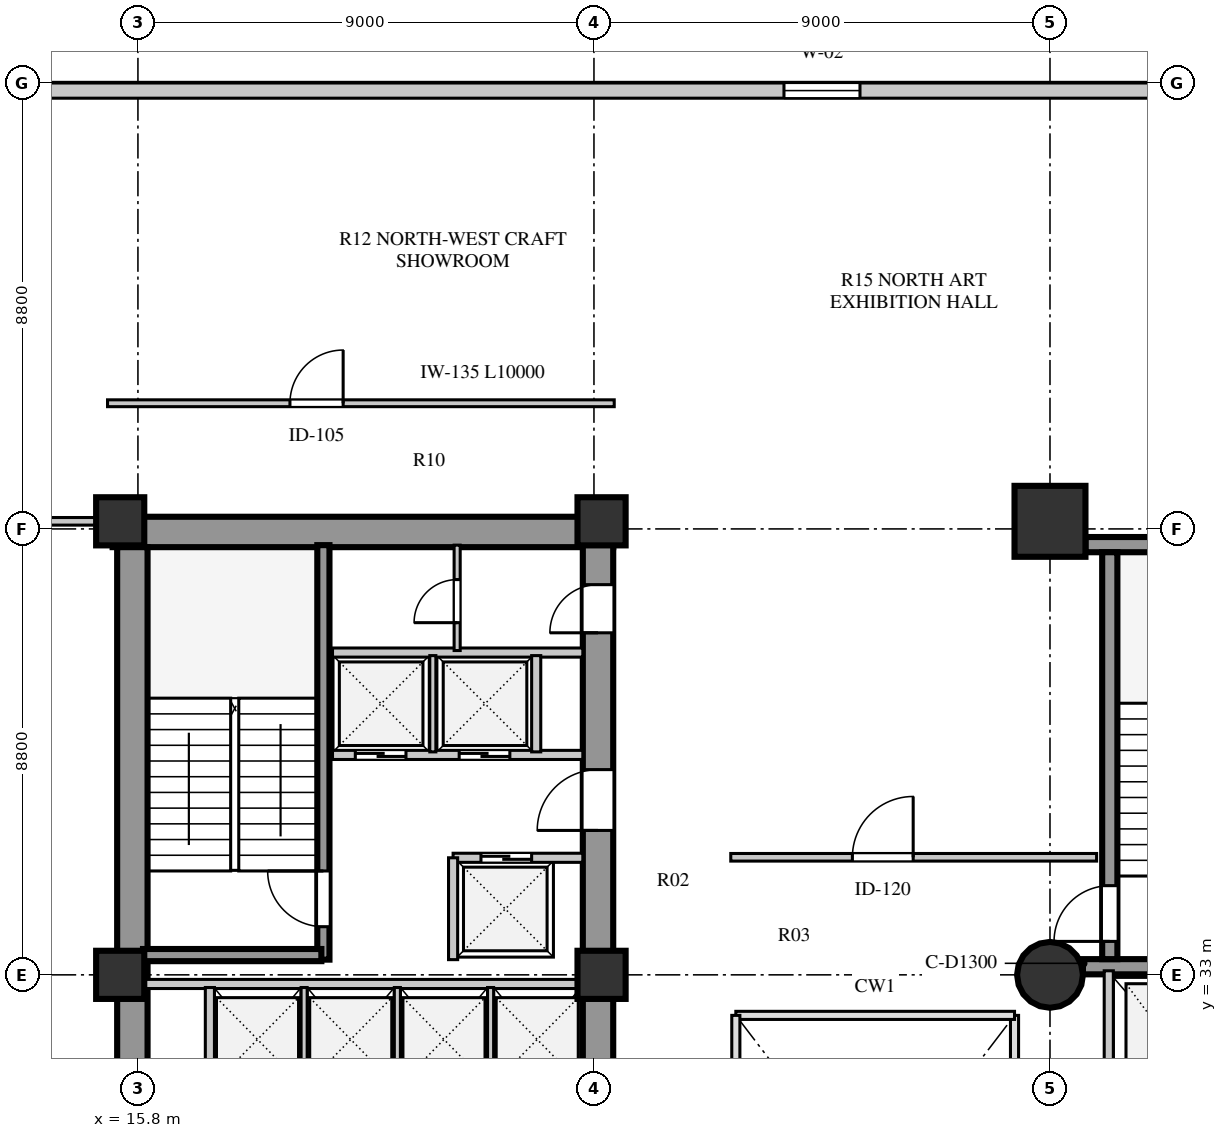
"""IFC4 building model, lengths in metres.
Left out: names, types, materials, properties, quantities, classifications, styles, units other than length and angle.
Written with IfcOpenShell. Run it as: python <this file> out.ifc"""

import sys

from ifc_helpers import new_model, si_unit, direction, frame, frame_2d, origin, origin_2d, place, context, subcontext, project, spatial, rectangle, circle, extrude, element, fill, save


model = new_model("IFC4")
c1 = context("Model", 3, precision=1e-05, world=origin(), true_north=direction((0.0, 1.0)))
c2 = subcontext(c1, "Body", "Model", "MODEL_VIEW")
j1 = project(units=[si_unit("LENGTHUNIT", "METRE"), si_unit("PLANEANGLEUNIT", "RADIAN")], contexts=[c1])
p1 = place(None, origin())
s1 = spatial("IfcSite", under=j1, at=p1, CompositionType="ELEMENT")
p2 = place(p1, origin())
s2 = spatial("IfcBuilding", under=s1, at=p2, CompositionType="ELEMENT")
p3 = place(p2, frame((0.0, 0.0, 8.0)))
s3 = spatial("IfcBuildingStorey", under=s2, at=p3, CompositionType="ELEMENT", Elevation=8.0)
p4 = place(p3, frame((15.3, 41.74, 0.0), z_axis=(0.0, 0.0, 1.0), x_axis=(1.0, 0.0, 0.0)))
e1 = element("IfcWall", 1, at=p4, inside=s3, PredefinedType="SHEAR", context=c2, shape_type="SweptSolid", body=[
    extrude(rectangle(XDim=9.88, YDim=0.6, at=frame_2d((4.94, 0.0))), origin(), (0.0, 0.0, 1.0), 4.22),
])
p5 = place(p3, frame((15.69, 15.81, 0.0), z_axis=(0.0, 0.0, 1.0), x_axis=(0.0, 1.0, 0.0)))
e2 = element("IfcWall", 2, at=p5, inside=s3, PredefinedType="SHEAR", context=c2, shape_type="SweptSolid", body=[
    extrude(rectangle(XDim=25.63, YDim=0.6, at=frame_2d((12.815, 0.0))), origin(), (0.0, 0.0, 1.0), 4.22),
])
p6 = place(p3, frame((24.88, 15.74, 0.0), z_axis=(0.0, 0.0, 1.0), x_axis=(0.0, 1.0, 0.0)))
e3 = element("IfcWall", 3, at=p6, inside=s3, PredefinedType="SHEAR", context=c2, shape_type="SweptSolid", body=[
    extrude(rectangle(XDim=25.76, YDim=0.6, at=frame_2d((12.88, 0.0))), origin(), (0.0, 0.0, 1.0), 4.22),
])
p7 = place(p6, frame((1.61, 0.0, 0.0)))
e4 = element("IfcOpeningElement", 4, at=p7, cuts=e3, PredefinedType="OPENING", context=c2, shape_type="SweptSolid", body=[
    extrude(rectangle(XDim=1.2, YDim=2.1, at=frame_2d((0.6, 1.05))), frame((0.0, 0.31, 0.0), z_axis=(0.0, -1.0, 0.0), x_axis=(1.0, 0.0, 0.0)), (0.0, 0.0, 1.0), 0.62),
])
p8 = place(p6, frame((6.78, 0.0, 0.0)))
e5 = element("IfcOpeningElement", 5, at=p8, cuts=e3, PredefinedType="OPENING", context=c2, shape_type="SweptSolid", body=[
    extrude(rectangle(XDim=0.85, YDim=2.06, at=frame_2d((0.425, 1.03))), frame((0.0, 0.31, 0.0), z_axis=(0.0, -1.0, 0.0), x_axis=(1.0, 0.0, 0.0)), (0.0, 0.0, 1.0), 0.62),
])
p9 = place(p6, frame((12.11, 0.0, 0.0)))
e6 = element("IfcOpeningElement", 6, at=p9, cuts=e3, PredefinedType="OPENING", context=c2, shape_type="SweptSolid", body=[
    extrude(rectangle(XDim=1.5, YDim=2.12, at=frame_2d((0.75, 1.06))), frame((0.0, 0.31, 0.0), z_axis=(0.0, -1.0, 0.0), x_axis=(1.0, 0.0, 0.0)), (0.0, 0.0, 1.0), 0.62),
])
p10 = place(p6, frame((20.11, 0.0, 0.0)))
e7 = element("IfcOpeningElement", 7, at=p10, cuts=e3, PredefinedType="OPENING", context=c2, shape_type="SweptSolid", body=[
    extrude(rectangle(XDim=1.2, YDim=2.12, at=frame_2d((0.6, 1.06))), frame((0.0, 0.31, 0.0), z_axis=(0.0, -1.0, 0.0), x_axis=(1.0, 0.0, 0.0)), (0.0, 0.0, 1.0), 0.62),
])
p11 = place(p6, frame((24.01, 0.0, 0.0)))
e8 = element("IfcOpeningElement", 8, at=p11, cuts=e3, PredefinedType="OPENING", context=c2, shape_type="SweptSolid", body=[
    extrude(rectangle(XDim=0.95, YDim=2.1, at=frame_2d((0.475, 1.05))), frame((0.0, 0.31, 0.0), z_axis=(0.0, -1.0, 0.0), x_axis=(1.0, 0.0, 0.0)), (0.0, 0.0, 1.0), 0.62),
])
p12 = place(p3, frame((34.45, 33.16, 0.0), z_axis=(0.0, 0.0, 1.0), x_axis=(1.0, 0.0, 0.0)))
e9 = element("IfcWall", 9, at=p12, inside=s3, PredefinedType="SHEAR", context=c2, shape_type="SweptSolid", body=[
    extrude(rectangle(XDim=4.42, YDim=0.3, at=frame_2d((2.21, 0.0))), origin(), (0.0, 0.0, 1.0), 4.22),
])
p13 = place(p3, frame((34.5, 41.49, 0.0), z_axis=(0.0, 0.0, 1.0), x_axis=(1.0, 0.0, 0.0)))
e10 = element("IfcWall", 10, at=p13, inside=s3, PredefinedType="SHEAR", context=c2, shape_type="SweptSolid", body=[
    extrude(rectangle(XDim=4.37, YDim=0.3, at=frame_2d((2.185, 0.0))), origin(), (0.0, 0.0, 1.0), 4.22),
])
p14 = place(p3, frame((34.98, 33.31, 0.0), z_axis=(0.0, 0.0, 1.0), x_axis=(0.0, 1.0, 0.0)))
e11 = element("IfcWall", 11, at=p14, inside=s3, PredefinedType="SHEAR", context=c2, shape_type="SweptSolid", body=[
    extrude(rectangle(XDim=8.03, YDim=0.3, at=frame_2d((4.015, 0.0))), origin(), (0.0, 0.0, 1.0), 4.22),
])
p15 = place(p14, frame((0.35, 0.0, 0.0)))
e12 = element("IfcOpeningElement", 12, at=p15, cuts=e11, PredefinedType="OPENING", context=c2, shape_type="SweptSolid", body=[
    extrude(rectangle(XDim=1.1, YDim=2.1, at=frame_2d((0.55, 1.05))), frame((0.0, 0.16, 0.0), z_axis=(0.0, -1.0, 0.0), x_axis=(1.0, 0.0, 0.0)), (0.0, 0.0, 1.0), 0.32),
])
for number, where, z_axis, x_axis in (
    (13, (15.45, 33.0, 0.0), (0.0, 0.0, 1.0), (1.0, 0.0, 0.0)),
    (14, (15.45, 41.95, 0.0), (0.0, 0.0, 1.0), (1.0, 0.0, 0.0)),
    (15, (24.95, 33.0, 0.0), (0.0, 0.0, 1.0), (1.0, 0.0, 0.0)),
    (16, (24.95, 41.95, 0.0), (0.0, 0.0, 1.0), (1.0, 0.0, 0.0)),
):
    element("IfcColumn", number, at=place(p3, frame(where, z_axis=z_axis, x_axis=x_axis)), inside=s3, PredefinedType="COLUMN", context=c2, shape_type="SweptSolid", body=[
        extrude(rectangle(XDim=0.95, YDim=0.95, at=origin_2d()), origin(), (0.0, 0.0, 1.0), 4.22),
    ])
p16 = place(p3, frame((33.8, 33.0, 0.0), z_axis=(0.0, 0.0, 1.0), x_axis=(1.0, 0.0, 0.0)))
e17 = element("IfcColumn", 17, at=p16, inside=s3, PredefinedType="COLUMN", context=c2, shape_type="SweptSolid", body=[
    extrude(circle(Radius=0.65, at=origin_2d()), origin(), (0.0, 0.0, 1.0), 4.22),
])
p17 = place(p3, frame((33.8, 41.95, 0.0), z_axis=(0.0, 0.0, 1.0), x_axis=(1.0, 0.0, 0.0)))
e18 = element("IfcColumn", 18, at=p17, inside=s3, PredefinedType="COLUMN", context=c2, shape_type="SweptSolid", body=[
    extrude(rectangle(XDim=1.4, YDim=1.4, at=origin_2d()), origin(), (0.0, 0.0, 1.0), 4.22),
])
p18 = place(p3, frame((46.3, 50.45, 0.0), z_axis=(0.0, 0.0, 1.0), x_axis=(-1.0, 0.0, 0.0)))
e19 = element("IfcWall", 19, at=p18, inside=s3, PredefinedType="STANDARD", context=c2, shape_type="SweptSolid", body=[
    extrude(rectangle(XDim=34.0, YDim=0.3, at=frame_2d((17.0, 0.0))), origin(), (0.0, 0.0, 1.0), 4.22),
])
p19 = place(p18, frame((16.25, 0.0, 0.8)))
e20 = element("IfcOpeningElement", 20, at=p19, cuts=e19, PredefinedType="OPENING", context=c2, shape_type="SweptSolid", body=[
    extrude(rectangle(XDim=1.5, YDim=2.0, at=frame_2d((0.75, 1.0))), frame((0.0, 0.16, 0.0), z_axis=(0.0, -1.0, 0.0), x_axis=(1.0, 0.0, 0.0)), (0.0, 0.0, 1.0), 0.32),
])
p20 = place(p3, frame((15.9, 32.82, 0.0), z_axis=(0.0, 0.0, 1.0), x_axis=(1.0, 0.0, 0.0)))
e21 = element("IfcWall", 21, at=p20, inside=s3, PredefinedType="SOLIDWALL", context=c2, shape_type="SweptSolid", body=[
    extrude(rectangle(XDim=8.68, YDim=0.18, at=frame_2d((4.34, 0.0))), origin(), (0.0, 0.0, 1.0), 3.42),
])
p21 = place(p3, frame((17.22, 30.7, 0.0), z_axis=(0.0, 0.0, 1.0), x_axis=(0.0, 1.0, 0.0)))
e22 = element("IfcWall", 22, at=p21, inside=s3, PredefinedType="SOLIDWALL", context=c2, shape_type="SweptSolid", body=[
    extrude(rectangle(XDim=2.05, YDim=0.18, at=frame_2d((1.025, 0.0))), origin(), (0.0, 0.0, 1.0), 4.22),
])
for number, where, z_axis, x_axis in (
    (23, (19.08, 30.7, 0.0), (0.0, 0.0, 1.0), (0.0, 1.0, 0.0)),
    (24, (20.92, 30.7, 0.0), (0.0, 0.0, 1.0), (0.0, 1.0, 0.0)),
    (25, (22.76, 30.7, 0.0), (0.0, 0.0, 1.0), (0.0, 1.0, 0.0)),
):
    element("IfcWall", number, at=place(p3, frame(where, z_axis=z_axis, x_axis=x_axis)), inside=s3, PredefinedType="PARTITIONING", context=c2, shape_type="SweptSolid", body=[
        extrude(rectangle(XDim=2.05, YDim=0.12, at=frame_2d((1.025, 0.0))), origin(), (0.0, 0.0, 1.0), 4.22),
    ])
p22 = place(p3, frame((19.46, 33.3, 0.0), z_axis=(0.0, 0.0, 1.0), x_axis=(0.0, 1.0, 0.0)))
e26 = element("IfcWall", 26, at=p22, inside=s3, PredefinedType="SHEAR", context=c2, shape_type="SweptSolid", body=[
    extrude(rectangle(XDim=8.18, YDim=0.24, at=frame_2d((4.09, 0.0))), origin(), (0.0, 0.0, 1.0), 4.5),
])
p23 = place(p22, frame((0.65, 0.0, 0.0)))
e27 = element("IfcOpeningElement", 27, at=p23, cuts=e26, PredefinedType="OPENING", context=c2, shape_type="SweptSolid", body=[
    extrude(rectangle(XDim=1.1, YDim=2.1, at=frame_2d((0.55, 1.05))), frame((0.0, 0.13, 0.0), z_axis=(0.0, -1.0, 0.0), x_axis=(1.0, 0.0, 0.0)), (0.0, 0.0, 1.0), 0.26),
])
p24 = place(p3, frame((15.9, 33.39, 0.0), z_axis=(0.0, 0.0, 1.0), x_axis=(1.0, 0.0, 0.0)))
e28 = element("IfcWall", 28, at=p24, inside=s3, PredefinedType="SHEAR", context=c2, shape_type="SweptSolid", body=[
    extrude(rectangle(XDim=3.52, YDim=0.24, at=frame_2d((1.76, 0.0))), origin(), (0.0, 0.0, 1.0), 4.5),
])
p25 = place(p3, frame((22.02, 35.31, 0.0), z_axis=(0.0, 0.0, 1.0), x_axis=(1.0, 0.0, 0.0)))
e29 = element("IfcWall", 29, at=p25, inside=s3, PredefinedType="SOLIDWALL", context=c2, shape_type="SweptSolid", body=[
    extrude(rectangle(XDim=2.56, YDim=0.18, at=frame_2d((1.28, 0.0))), origin(), (0.0, 0.0, 1.0), 4.22),
])
p26 = place(p25, frame((0.55, 0.0, 0.0)))
e30 = element("IfcOpeningElement", 30, at=p26, cuts=e29, PredefinedType="OPENING", context=c2, shape_type="SweptSolid", body=[
    extrude(rectangle(XDim=1.0, YDim=2.1, at=frame_2d((0.5, 1.05))), frame((0.0, 0.1, 0.0), z_axis=(0.0, -1.0, 0.0), x_axis=(1.0, 0.0, 0.0)), (0.0, 0.0, 1.0), 0.2),
])
p27 = place(p3, frame((22.02, 33.3, 0.0), z_axis=(0.0, 0.0, 1.0), x_axis=(0.0, 1.0, 0.0)))
e31 = element("IfcWall", 31, at=p27, inside=s3, PredefinedType="SOLIDWALL", context=c2, shape_type="SweptSolid", body=[
    extrude(rectangle(XDim=2.01, YDim=0.18, at=frame_2d((1.005, 0.0))), origin(), (0.0, 0.0, 1.0), 4.22),
])
p28 = place(p3, frame((19.64, 37.34, 0.0), z_axis=(0.0, 0.0, 1.0), x_axis=(1.0, 0.0, 0.0)))
e32 = element("IfcWall", 32, at=p28, inside=s3, PredefinedType="SOLIDWALL", context=c2, shape_type="SweptSolid", body=[
    extrude(rectangle(XDim=4.94, YDim=0.18, at=frame_2d((2.47, 0.0))), origin(), (0.0, 0.0, 1.0), 4.22),
])
p29 = place(p28, frame((0.45, 0.0, 0.0)))
e33 = element("IfcOpeningElement", 33, at=p29, cuts=e32, PredefinedType="OPENING", context=c2, shape_type="SweptSolid", body=[
    extrude(rectangle(XDim=1.0, YDim=2.1, at=frame_2d((0.5, 1.05))), frame((0.0, 0.1, 0.0), z_axis=(0.0, -1.0, 0.0), x_axis=(1.0, 0.0, 0.0)), (0.0, 0.0, 1.0), 0.2),
])
p30 = place(p28, frame((2.5, 0.0, 0.0)))
e34 = element("IfcOpeningElement", 34, at=p30, cuts=e32, PredefinedType="OPENING", context=c2, shape_type="SweptSolid", body=[
    extrude(rectangle(XDim=1.0, YDim=2.1, at=frame_2d((0.5, 1.05))), frame((0.0, 0.1, 0.0), z_axis=(0.0, -1.0, 0.0), x_axis=(1.0, 0.0, 0.0)), (0.0, 0.0, 1.0), 0.2),
])
p31 = place(p3, frame((19.64, 39.36, 0.0), z_axis=(0.0, 0.0, 1.0), x_axis=(1.0, 0.0, 0.0)))
e35 = element("IfcWall", 35, at=p31, inside=s3, PredefinedType="SOLIDWALL", context=c2, shape_type="SweptSolid", body=[
    extrude(rectangle(XDim=4.94, YDim=0.18, at=frame_2d((2.47, 0.0))), origin(), (0.0, 0.0, 1.0), 4.22),
])
p32 = place(p3, frame((21.62, 37.4, 0.0), z_axis=(0.0, 0.0, 1.0), x_axis=(0.0, 1.0, 0.0)))
e36 = element("IfcWall", 36, at=p32, inside=s3, PredefinedType="PARTITIONING", context=c2, shape_type="SweptSolid", body=[
    extrude(rectangle(XDim=1.9, YDim=0.12, at=frame_2d((0.95, 0.0))), origin(), (0.0, 0.0, 1.0), 4.22),
])
p33 = place(p3, frame((23.66, 37.4, 0.0), z_axis=(0.0, 0.0, 1.0), x_axis=(0.0, 1.0, 0.0)))
e37 = element("IfcWall", 37, at=p33, inside=s3, PredefinedType="SOLIDWALL", context=c2, shape_type="SweptSolid", body=[
    extrude(rectangle(XDim=1.9, YDim=0.18, at=frame_2d((0.95, 0.0))), origin(), (0.0, 0.0, 1.0), 4.22),
])
p34 = place(p3, frame((22.1, 39.4, 0.0), z_axis=(0.0, 0.0, 1.0), x_axis=(0.0, 1.0, 0.0)))
e38 = element("IfcWall", 38, at=p34, inside=s3, PredefinedType="PARTITIONING", context=c2, shape_type="SweptSolid", body=[
    extrude(rectangle(XDim=2.08, YDim=0.12, at=frame_2d((1.04, 0.0))), origin(), (0.0, 0.0, 1.0), 4.22),
])
p35 = place(p34, frame((0.55, 0.0, 0.0)))
e39 = element("IfcOpeningElement", 39, at=p35, cuts=e38, PredefinedType="OPENING", context=c2, shape_type="SweptSolid", body=[
    extrude(rectangle(XDim=0.85, YDim=2.06, at=frame_2d((0.425, 1.03))), frame((0.0, 0.07, 0.0), z_axis=(0.0, -1.0, 0.0), x_axis=(1.0, 0.0, 0.0)), (0.0, 0.0, 1.0), 0.14),
])
p36 = place(p3, frame((34.96, 28.86, 0.0), z_axis=(0.0, 0.0, 1.0), x_axis=(0.0, 1.0, 0.0)))
e40 = element("IfcWall", 40, at=p36, inside=s3, PredefinedType="SOLIDWALL", context=c2, shape_type="SweptSolid", body=[
    extrude(rectangle(XDim=4.22, YDim=0.18, at=frame_2d((2.11, 0.0))), origin(), (0.0, 0.0, 1.0), 4.22),
])
p37 = place(p3, frame((6.88, 41.95, 0.0), z_axis=(0.0, 0.0, 1.0), x_axis=(1.0, 0.0, 0.0)))
e41 = element("IfcWall", 41, at=p37, inside=s3, PredefinedType="PARTITIONING", context=c2, shape_type="SweptSolid", body=[
    extrude(rectangle(XDim=8.32, YDim=0.15, at=frame_2d((4.16, 0.0))), origin(), (0.0, 0.0, 1.0), 3.72),
])
p38 = place(p3, frame((15.2, 44.28, 0.0), z_axis=(0.0, 0.0, 1.0), x_axis=(1.0, 0.0, 0.0)))
e42 = element("IfcWall", 42, at=p38, inside=s3, PredefinedType="PARTITIONING", context=c2, shape_type="SweptSolid", body=[
    extrude(rectangle(XDim=10.0, YDim=0.135, at=frame_2d((5.0, 0.0))), origin(), (0.0, 0.0, 1.0), 4.22),
])
p39 = place(p38, frame((3.6, 0.0, 0.0)))
e43 = element("IfcOpeningElement", 43, at=p39, cuts=e42, PredefinedType="OPENING", context=c2, shape_type="SweptSolid", body=[
    extrude(rectangle(XDim=1.05, YDim=2.1, at=frame_2d((0.525, 1.05))), frame((0.0, 0.078, 0.0), z_axis=(0.0, -1.0, 0.0), x_axis=(1.0, 0.0, 0.0)), (0.0, 0.0, 1.0), 0.155),
])
p40 = place(p3, frame((27.5, 35.32, 0.0), z_axis=(0.0, 0.0, 1.0), x_axis=(1.0, 0.0, 0.0)))
e44 = element("IfcWall", 44, at=p40, inside=s3, PredefinedType="PARTITIONING", context=c2, shape_type="SweptSolid", body=[
    extrude(rectangle(XDim=7.22, YDim=0.15, at=frame_2d((3.61, 0.0))), origin(), (0.0, 0.0, 1.0), 4.22),
])
p41 = place(p40, frame((2.4, 0.0, 0.0)))
e45 = element("IfcOpeningElement", 45, at=p41, cuts=e44, PredefinedType="OPENING", context=c2, shape_type="SweptSolid", body=[
    extrude(rectangle(XDim=1.2, YDim=2.1, at=frame_2d((0.6, 1.05))), frame((0.0, 0.085, 0.0), z_axis=(0.0, -1.0, 0.0), x_axis=(1.0, 0.0, 0.0)), (0.0, 0.0, 1.0), 0.17),
])
p42 = place(p19, origin())
e46 = element("IfcWindow", 46, at=p42, inside=s3, PartitioningType="SINGLE_PANEL", PredefinedType="WINDOW", context=c2, shape_type="SweptSolid", body=[
    extrude(rectangle(XDim=1.5, YDim=2.0, at=frame_2d((0.75, 1.0))), frame((0.0, 0.03, 0.0), z_axis=(0.0, -1.0, 0.0), x_axis=(1.0, 0.0, 0.0)), (0.0, 0.0, 1.0), 0.06),
])
fill(e20, e46)
p43 = place(p23, origin())
e47 = element("IfcDoor", 47, at=p43, inside=s3, OperationType="SINGLE_SWING_RIGHT", PredefinedType="DOOR", context=c2, shape_type="SweptSolid", body=[
    extrude(rectangle(XDim=1.1, YDim=2.1, at=frame_2d((0.55, 1.05))), frame((0.0, 0.025, 0.0), z_axis=(0.0, -1.0, 0.0), x_axis=(1.0, 0.0, 0.0)), (0.0, 0.0, 1.0), 0.05),
])
fill(e27, e47)
p44 = place(p10, frame((1.2, 0.0, 0.0), z_axis=(0.0, 0.0, 1.0), x_axis=(-1.0, 0.0, 0.0)))
e48 = element("IfcDoor", 48, at=p44, inside=s3, OperationType="SINGLE_SWING_RIGHT", PredefinedType="DOOR", context=c2, shape_type="SweptSolid", body=[
    extrude(rectangle(XDim=1.2, YDim=2.12, at=frame_2d((0.6, 1.06))), frame((0.0, 0.025, 0.0), z_axis=(0.0, -1.0, 0.0), x_axis=(1.0, 0.0, 0.0)), (0.0, 0.0, 1.0), 0.05),
])
fill(e7, e48)
p45 = place(p29, frame((1.0, 0.0, 0.0), z_axis=(0.0, 0.0, 1.0), x_axis=(-1.0, 0.0, 0.0)))
e49 = element("IfcDoor", 49, at=p45, inside=s3, OperationType="DOUBLE_DOOR_SLIDING", PredefinedType="DOOR", context=c2, shape_type="SweptSolid", body=[
    extrude(rectangle(XDim=1.0, YDim=2.1, at=frame_2d((0.5, 1.05))), frame((0.0, 0.025, 0.0), z_axis=(0.0, -1.0, 0.0), x_axis=(1.0, 0.0, 0.0)), (0.0, 0.0, 1.0), 0.05),
])
fill(e33, e49)
p46 = place(p30, frame((1.0, 0.0, 0.0), z_axis=(0.0, 0.0, 1.0), x_axis=(-1.0, 0.0, 0.0)))
e50 = element("IfcDoor", 50, at=p46, inside=s3, OperationType="DOUBLE_DOOR_SLIDING", PredefinedType="DOOR", context=c2, shape_type="SweptSolid", body=[
    extrude(rectangle(XDim=1.0, YDim=2.1, at=frame_2d((0.5, 1.05))), frame((0.0, 0.025, 0.0), z_axis=(0.0, -1.0, 0.0), x_axis=(1.0, 0.0, 0.0)), (0.0, 0.0, 1.0), 0.05),
])
fill(e34, e50)
p47 = place(p26, origin())
e51 = element("IfcDoor", 51, at=p47, inside=s3, OperationType="DOUBLE_DOOR_SLIDING", PredefinedType="DOOR", context=c2, shape_type="SweptSolid", body=[
    extrude(rectangle(XDim=1.0, YDim=2.1, at=frame_2d((0.5, 1.05))), frame((0.0, 0.025, 0.0), z_axis=(0.0, -1.0, 0.0), x_axis=(1.0, 0.0, 0.0)), (0.0, 0.0, 1.0), 0.05),
])
fill(e30, e51)
p48 = place(p35, origin())
e52 = element("IfcDoor", 52, at=p48, inside=s3, OperationType="SINGLE_SWING_LEFT", PredefinedType="DOOR", context=c2, shape_type="SweptSolid", body=[
    extrude(rectangle(XDim=0.85, YDim=2.06, at=frame_2d((0.425, 1.03))), frame((0.0, 0.025, 0.0), z_axis=(0.0, -1.0, 0.0), x_axis=(1.0, 0.0, 0.0)), (0.0, 0.0, 1.0), 0.05),
])
fill(e39, e52)
p49 = place(p11, frame((0.95, 0.0, 0.0), z_axis=(0.0, 0.0, 1.0), x_axis=(-1.0, 0.0, 0.0)))
e53 = element("IfcDoor", 53, at=p49, inside=s3, OperationType="SINGLE_SWING_RIGHT", PredefinedType="DOOR", context=c2, shape_type="SweptSolid", body=[
    extrude(rectangle(XDim=0.95, YDim=2.1, at=frame_2d((0.475, 1.05))), frame((0.0, 0.025, 0.0), z_axis=(0.0, -1.0, 0.0), x_axis=(1.0, 0.0, 0.0)), (0.0, 0.0, 1.0), 0.05),
])
fill(e8, e53)
p50 = place(p15, origin())
e54 = element("IfcDoor", 54, at=p50, inside=s3, OperationType="SINGLE_SWING_LEFT", PredefinedType="DOOR", context=c2, shape_type="SweptSolid", body=[
    extrude(rectangle(XDim=1.1, YDim=2.1, at=frame_2d((0.55, 1.05))), frame((0.0, 0.025, 0.0), z_axis=(0.0, -1.0, 0.0), x_axis=(1.0, 0.0, 0.0)), (0.0, 0.0, 1.0), 0.05),
])
fill(e12, e54)
p51 = place(p39, origin())
e55 = element("IfcDoor", 55, at=p51, inside=s3, OperationType="SINGLE_SWING_RIGHT", PredefinedType="DOOR", context=c2, shape_type="SweptSolid", body=[
    extrude(rectangle(XDim=1.05, YDim=2.1, at=frame_2d((0.525, 1.05))), frame((0.0, 0.025, 0.0), z_axis=(0.0, -1.0, 0.0), x_axis=(1.0, 0.0, 0.0)), (0.0, 0.0, 1.0), 0.05),
])
fill(e43, e55)
p52 = place(p41, origin())
e56 = element("IfcDoor", 56, at=p52, inside=s3, OperationType="SINGLE_SWING_RIGHT", PredefinedType="DOOR", context=c2, shape_type="SweptSolid", body=[
    extrude(rectangle(XDim=1.2, YDim=2.1, at=frame_2d((0.6, 1.05))), frame((0.0, 0.025, 0.0), z_axis=(0.0, -1.0, 0.0), x_axis=(1.0, 0.0, 0.0)), (0.0, 0.0, 1.0), 0.05),
])
fill(e45, e56)
save(model, sys.argv[1])
